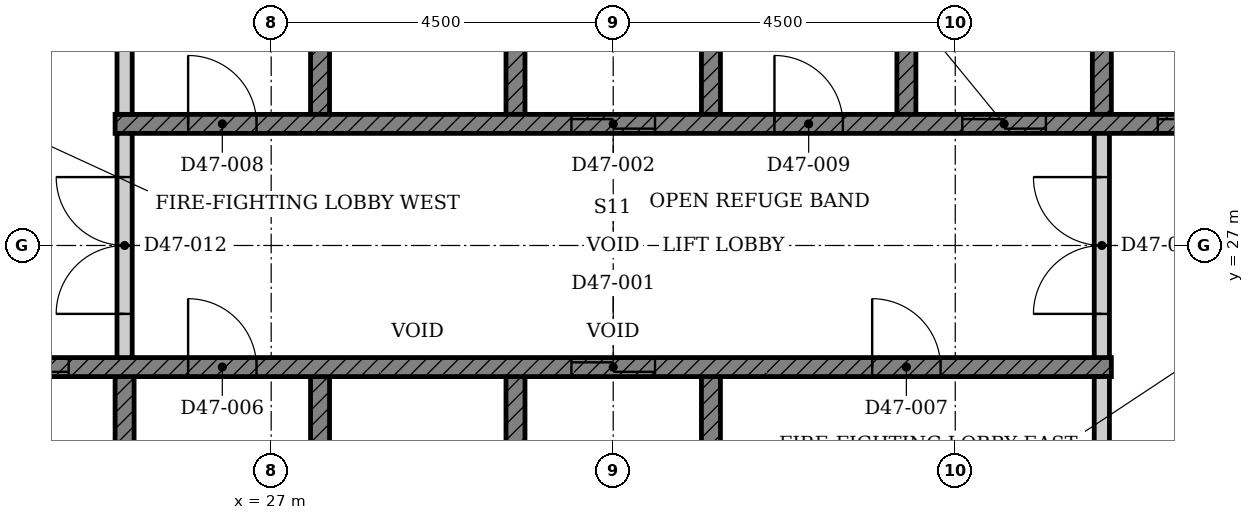
"""IFC4 building model, lengths in metres.
Left out: names, types, materials, properties, quantities, classifications, styles, units other than length and angle.
Written with IfcOpenShell. Run it as: python <this file> out.ifc"""

import sys

from ifc_helpers import new_model, si_unit, direction, frame, frame_2d, origin, place, context, subcontext, project, spatial, polyline, rectangle, outline, extrude, element, fill, save


model = new_model("IFC4")
c1 = context("Model", 3, precision=1e-05, world=origin(), true_north=direction((0.0, 1.0)))
c2 = subcontext(c1, "Body", "Model", "MODEL_VIEW")
j1 = project(units=[si_unit("LENGTHUNIT", "METRE"), si_unit("PLANEANGLEUNIT", "RADIAN")], contexts=[c1])
p1 = place(None, origin())
s1 = spatial("IfcSite", under=j1, at=p1, CompositionType="ELEMENT")
p2 = place(p1, origin())
s2 = spatial("IfcBuilding", under=s1, at=p2, CompositionType="ELEMENT")
p3 = place(p2, frame((0.0, 0.0, 187.6)))
s3 = spatial("IfcBuildingStorey", under=s2, at=p3, CompositionType="ELEMENT", Elevation=187.6)
p4 = place(p3, origin())
e1 = element("IfcWall", 1, at=p4, inside=s3, PredefinedType="SHEAR", context=c2, shape_type="SweptSolid", body=[
    extrude(outline(polyline([(22.375, 22.35), (25.197, 22.35), (25.197, 25.275), (24.947, 25.275), (24.947, 22.65), (22.625, 22.65), (22.625, 25.275), (22.375, 25.275), (22.375, 22.35)])), origin(), (0.0, 0.0, 1.0), 4.5),
])
p5 = place(p3, origin())
e2 = element("IfcWall", 2, at=p5, inside=s3, PredefinedType="SHEAR", context=c2, shape_type="SweptSolid", body=[
    extrude(outline(polyline([(27.518, 22.35), (32.911, 22.35), (32.911, 25.275), (32.661, 25.275), (32.661, 22.65), (30.339, 22.65), (30.339, 25.275), (30.089, 25.275), (30.089, 22.65), (27.768, 22.65), (27.768, 25.275), (27.518, 25.275), (27.518, 22.35)])), origin(), (0.0, 0.0, 1.0), 4.5),
])
p6 = place(p3, origin())
e3 = element("IfcWall", 3, at=p6, inside=s3, PredefinedType="SHEAR", context=c2, shape_type="SweptSolid", body=[
    extrude(outline(polyline([(27.518, 28.725), (27.768, 28.725), (27.768, 31.35), (30.089, 31.35), (30.089, 28.725), (30.339, 28.725), (30.339, 31.35), (32.661, 31.35), (32.661, 28.725), (32.911, 28.725), (32.911, 31.65), (27.518, 31.65), (27.518, 28.725)])), origin(), (0.0, 0.0, 1.0), 4.5),
])
p7 = place(p3, origin())
e4 = element("IfcWall", 4, at=p7, inside=s3, PredefinedType="SHEAR", context=c2, shape_type="SweptSolid", body=[
    extrude(outline(polyline([(35.232, 28.725), (35.482, 28.725), (35.482, 31.35), (37.803, 31.35), (37.803, 28.725), (38.053, 28.725), (38.053, 31.35), (40.375, 31.35), (40.375, 28.725), (40.625, 28.725), (40.625, 31.65), (35.232, 31.65), (35.232, 28.725)])), origin(), (0.0, 0.0, 1.0), 4.5),
])
p8 = place(p3, frame((22.375, 25.4, 0.0), z_axis=(0.0, 0.0, 1.0), x_axis=(1.0, 0.0, 0.0)))
e5 = element("IfcWall", 5, at=p8, inside=s3, PredefinedType="SHEAR", context=c2, shape_type="SweptSolid", body=[
    extrude(rectangle(XDim=15.678, YDim=0.25, at=frame_2d((7.839, 0.0))), origin(), (0.0, 0.0, 1.0), 4.5),
])
p9 = place(p8, frame((8.575, 0.0, 0.0)))
e6 = element("IfcOpeningElement", 6, at=p9, cuts=e5, PredefinedType="OPENING", context=c2, shape_type="SweptSolid", body=[
    extrude(rectangle(XDim=1.1, YDim=2.1, at=frame_2d((0.55, 1.05))), frame((0.0, 0.135, 0.0), z_axis=(0.0, -1.0, 0.0), x_axis=(1.0, 0.0, 0.0)), (0.0, 0.0, 1.0), 0.27),
])
p10 = place(p8, frame((0.861, 0.0, 0.0)))
e7 = element("IfcOpeningElement", 7, at=p10, cuts=e5, PredefinedType="OPENING", context=c2, shape_type="SweptSolid", body=[
    extrude(rectangle(XDim=1.1, YDim=2.1, at=frame_2d((0.55, 1.05))), frame((0.0, 0.135, 0.0), z_axis=(0.0, -1.0, 0.0), x_axis=(1.0, 0.0, 0.0)), (0.0, 0.0, 1.0), 0.27),
])
p11 = place(p8, frame((3.532, 0.0, 0.0)))
e8 = element("IfcOpeningElement", 8, at=p11, cuts=e5, PredefinedType="OPENING", context=c2, shape_type="SweptSolid", body=[
    extrude(rectangle(XDim=0.9, YDim=2.1, at=frame_2d((0.45, 1.05))), frame((0.0, 0.135, 0.0), z_axis=(0.0, -1.0, 0.0), x_axis=(1.0, 0.0, 0.0)), (0.0, 0.0, 1.0), 0.27),
])
p12 = place(p8, frame((12.532, 0.0, 0.0)))
e9 = element("IfcOpeningElement", 9, at=p12, cuts=e5, PredefinedType="OPENING", context=c2, shape_type="SweptSolid", body=[
    extrude(rectangle(XDim=0.9, YDim=2.1, at=frame_2d((0.45, 1.05))), frame((0.0, 0.135, 0.0), z_axis=(0.0, -1.0, 0.0), x_axis=(1.0, 0.0, 0.0)), (0.0, 0.0, 1.0), 0.27),
])
p13 = place(p3, frame((24.947, 28.6, 0.0), z_axis=(0.0, 0.0, 1.0), x_axis=(1.0, 0.0, 0.0)))
e10 = element("IfcWall", 10, at=p13, inside=s3, PredefinedType="SHEAR", context=c2, shape_type="SweptSolid", body=[
    extrude(rectangle(XDim=15.678, YDim=0.25, at=frame_2d((7.839, 0.0))), origin(), (0.0, 0.0, 1.0), 4.5),
])
p14 = place(p13, frame((6.004, 0.0, 0.0)))
e11 = element("IfcOpeningElement", 11, at=p14, cuts=e10, PredefinedType="OPENING", context=c2, shape_type="SweptSolid", body=[
    extrude(rectangle(XDim=1.1, YDim=2.1, at=frame_2d((0.55, 1.05))), frame((0.0, 0.135, 0.0), z_axis=(0.0, -1.0, 0.0), x_axis=(1.0, 0.0, 0.0)), (0.0, 0.0, 1.0), 0.27),
])
p15 = place(p13, frame((11.146, 0.0, 0.0)))
e12 = element("IfcOpeningElement", 12, at=p15, cuts=e10, PredefinedType="OPENING", context=c2, shape_type="SweptSolid", body=[
    extrude(rectangle(XDim=1.1, YDim=2.1, at=frame_2d((0.55, 1.05))), frame((0.0, 0.135, 0.0), z_axis=(0.0, -1.0, 0.0), x_axis=(1.0, 0.0, 0.0)), (0.0, 0.0, 1.0), 0.27),
])
p16 = place(p13, frame((13.718, 0.0, 0.0)))
e13 = element("IfcOpeningElement", 13, at=p16, cuts=e10, PredefinedType="OPENING", context=c2, shape_type="SweptSolid", body=[
    extrude(rectangle(XDim=1.1, YDim=2.1, at=frame_2d((0.55, 1.05))), frame((0.0, 0.135, 0.0), z_axis=(0.0, -1.0, 0.0), x_axis=(1.0, 0.0, 0.0)), (0.0, 0.0, 1.0), 0.27),
])
p17 = place(p13, frame((0.961, 0.0, 0.0)))
e14 = element("IfcOpeningElement", 14, at=p17, cuts=e10, PredefinedType="OPENING", context=c2, shape_type="SweptSolid", body=[
    extrude(rectangle(XDim=0.9, YDim=2.1, at=frame_2d((0.45, 1.05))), frame((0.0, 0.135, 0.0), z_axis=(0.0, -1.0, 0.0), x_axis=(1.0, 0.0, 0.0)), (0.0, 0.0, 1.0), 0.27),
])
p18 = place(p13, frame((8.675, 0.0, 0.0)))
e15 = element("IfcOpeningElement", 15, at=p18, cuts=e10, PredefinedType="OPENING", context=c2, shape_type="SweptSolid", body=[
    extrude(rectangle(XDim=0.9, YDim=2.1, at=frame_2d((0.45, 1.05))), frame((0.0, 0.135, 0.0), z_axis=(0.0, -1.0, 0.0), x_axis=(1.0, 0.0, 0.0)), (0.0, 0.0, 1.0), 0.27),
])
for number, where, z_axis, x_axis in (
    (16, (37.928, 22.65, 0.0), (0.0, 0.0, 1.0), (0.0, 1.0, 0.0)),
    (17, (25.072, 28.725, 0.0), (0.0, 0.0, 1.0), (0.0, 1.0, 0.0)),
):
    element("IfcWall", number, at=place(p3, frame(where, z_axis=z_axis, x_axis=x_axis)), inside=s3, PredefinedType="PARTITIONING", context=c2, shape_type="SweptSolid", body=[
        extrude(rectangle(XDim=2.625, YDim=0.2, at=frame_2d((1.312, 0.0))), origin(), (0.0, 0.0, 1.0), 4.5),
    ])
p19 = place(p3, frame((25.072, 25.525, 0.0), z_axis=(0.0, 0.0, 1.0), x_axis=(0.0, 1.0, 0.0)))
e18 = element("IfcWall", 18, at=p19, inside=s3, PredefinedType="PARTITIONING", context=c2, shape_type="SweptSolid", body=[
    extrude(rectangle(XDim=2.95, YDim=0.2, at=frame_2d((1.475, 0.0))), origin(), (0.0, 0.0, 1.0), 4.5),
])
p20 = place(p19, frame((0.575, 0.0, 0.0)))
e19 = element("IfcOpeningElement", 19, at=p20, cuts=e18, PredefinedType="OPENING", context=c2, shape_type="SweptSolid", body=[
    extrude(rectangle(XDim=1.8, YDim=2.1, at=frame_2d((0.9, 1.05))), frame((0.0, 0.11, 0.0), z_axis=(0.0, -1.0, 0.0), x_axis=(1.0, 0.0, 0.0)), (0.0, 0.0, 1.0), 0.22),
])
p21 = place(p3, frame((37.928, 25.525, 0.0), z_axis=(0.0, 0.0, 1.0), x_axis=(0.0, 1.0, 0.0)))
e20 = element("IfcWall", 20, at=p21, inside=s3, PredefinedType="PARTITIONING", context=c2, shape_type="SweptSolid", body=[
    extrude(rectangle(XDim=2.95, YDim=0.2, at=frame_2d((1.475, 0.0))), origin(), (0.0, 0.0, 1.0), 4.5),
])
p22 = place(p21, frame((0.575, 0.0, 0.0)))
e21 = element("IfcOpeningElement", 21, at=p22, cuts=e20, PredefinedType="OPENING", context=c2, shape_type="SweptSolid", body=[
    extrude(rectangle(XDim=1.8, YDim=2.1, at=frame_2d((0.9, 1.05))), frame((0.0, 0.11, 0.0), z_axis=(0.0, -1.0, 0.0), x_axis=(1.0, 0.0, 0.0)), (0.0, 0.0, 1.0), 0.22),
])
p23 = place(p9, origin())
e22 = element("IfcDoor", 22, at=p23, inside=s3, OperationType="DOUBLE_DOOR_SLIDING", PredefinedType="DOOR", context=c2, shape_type="SweptSolid", body=[
    extrude(rectangle(XDim=1.1, YDim=2.1, at=frame_2d((0.55, 1.05))), frame((0.0, 0.025, 0.0), z_axis=(0.0, -1.0, 0.0), x_axis=(1.0, 0.0, 0.0)), (0.0, 0.0, 1.0), 0.05),
])
fill(e6, e22)
p24 = place(p14, origin())
e23 = element("IfcDoor", 23, at=p24, inside=s3, OperationType="DOUBLE_DOOR_SLIDING", PredefinedType="DOOR", context=c2, shape_type="SweptSolid", body=[
    extrude(rectangle(XDim=1.1, YDim=2.1, at=frame_2d((0.55, 1.05))), frame((0.0, 0.025, 0.0), z_axis=(0.0, -1.0, 0.0), x_axis=(1.0, 0.0, 0.0)), (0.0, 0.0, 1.0), 0.05),
])
fill(e11, e23)
p25 = place(p15, origin())
e24 = element("IfcDoor", 24, at=p25, inside=s3, OperationType="DOUBLE_DOOR_SLIDING", PredefinedType="DOOR", context=c2, shape_type="SweptSolid", body=[
    extrude(rectangle(XDim=1.1, YDim=2.1, at=frame_2d((0.55, 1.05))), frame((0.0, 0.025, 0.0), z_axis=(0.0, -1.0, 0.0), x_axis=(1.0, 0.0, 0.0)), (0.0, 0.0, 1.0), 0.05),
])
fill(e12, e24)
p26 = place(p10, origin())
e25 = element("IfcDoor", 25, at=p26, inside=s3, OperationType="DOUBLE_DOOR_SLIDING", PredefinedType="DOOR", context=c2, shape_type="SweptSolid", body=[
    extrude(rectangle(XDim=1.1, YDim=2.1, at=frame_2d((0.55, 1.05))), frame((0.0, 0.025, 0.0), z_axis=(0.0, -1.0, 0.0), x_axis=(1.0, 0.0, 0.0)), (0.0, 0.0, 1.0), 0.05),
])
fill(e7, e25)
p27 = place(p16, origin())
e26 = element("IfcDoor", 26, at=p27, inside=s3, OperationType="DOUBLE_DOOR_SLIDING", PredefinedType="DOOR", context=c2, shape_type="SweptSolid", body=[
    extrude(rectangle(XDim=1.1, YDim=2.1, at=frame_2d((0.55, 1.05))), frame((0.0, 0.025, 0.0), z_axis=(0.0, -1.0, 0.0), x_axis=(1.0, 0.0, 0.0)), (0.0, 0.0, 1.0), 0.05),
])
fill(e13, e26)
p28 = place(p11, origin())
e27 = element("IfcDoor", 27, at=p28, inside=s3, OperationType="SINGLE_SWING_LEFT", PredefinedType="DOOR", context=c2, shape_type="SweptSolid", body=[
    extrude(rectangle(XDim=0.9, YDim=2.1, at=frame_2d((0.45, 1.05))), frame((0.0, 0.025, 0.0), z_axis=(0.0, -1.0, 0.0), x_axis=(1.0, 0.0, 0.0)), (0.0, 0.0, 1.0), 0.05),
])
fill(e8, e27)
p29 = place(p12, origin())
e28 = element("IfcDoor", 28, at=p29, inside=s3, OperationType="SINGLE_SWING_LEFT", PredefinedType="DOOR", context=c2, shape_type="SweptSolid", body=[
    extrude(rectangle(XDim=0.9, YDim=2.1, at=frame_2d((0.45, 1.05))), frame((0.0, 0.025, 0.0), z_axis=(0.0, -1.0, 0.0), x_axis=(1.0, 0.0, 0.0)), (0.0, 0.0, 1.0), 0.05),
])
fill(e9, e28)
p30 = place(p17, origin())
e29 = element("IfcDoor", 29, at=p30, inside=s3, OperationType="SINGLE_SWING_LEFT", PredefinedType="DOOR", context=c2, shape_type="SweptSolid", body=[
    extrude(rectangle(XDim=0.9, YDim=2.1, at=frame_2d((0.45, 1.05))), frame((0.0, 0.025, 0.0), z_axis=(0.0, -1.0, 0.0), x_axis=(1.0, 0.0, 0.0)), (0.0, 0.0, 1.0), 0.05),
])
fill(e14, e29)
p31 = place(p18, origin())
e30 = element("IfcDoor", 30, at=p31, inside=s3, OperationType="SINGLE_SWING_LEFT", PredefinedType="DOOR", context=c2, shape_type="SweptSolid", body=[
    extrude(rectangle(XDim=0.9, YDim=2.1, at=frame_2d((0.45, 1.05))), frame((0.0, 0.025, 0.0), z_axis=(0.0, -1.0, 0.0), x_axis=(1.0, 0.0, 0.0)), (0.0, 0.0, 1.0), 0.05),
])
fill(e15, e30)
p32 = place(p20, origin())
e31 = element("IfcDoor", 31, at=p32, inside=s3, OperationType="DOUBLE_DOOR_SINGLE_SWING", PredefinedType="DOOR", context=c2, shape_type="SweptSolid", body=[
    extrude(rectangle(XDim=1.8, YDim=2.1, at=frame_2d((0.9, 1.05))), frame((0.0, 0.025, 0.0), z_axis=(0.0, -1.0, 0.0), x_axis=(1.0, 0.0, 0.0)), (0.0, 0.0, 1.0), 0.05),
])
fill(e19, e31)
p33 = place(p22, origin())
e32 = element("IfcDoor", 32, at=p33, inside=s3, OperationType="DOUBLE_DOOR_SINGLE_SWING", PredefinedType="DOOR", context=c2, shape_type="SweptSolid", body=[
    extrude(rectangle(XDim=1.8, YDim=2.1, at=frame_2d((0.9, 1.05))), frame((0.0, 0.025, 0.0), z_axis=(0.0, -1.0, 0.0), x_axis=(1.0, 0.0, 0.0)), (0.0, 0.0, 1.0), 0.05),
])
fill(e21, e32)
save(model, sys.argv[1])
